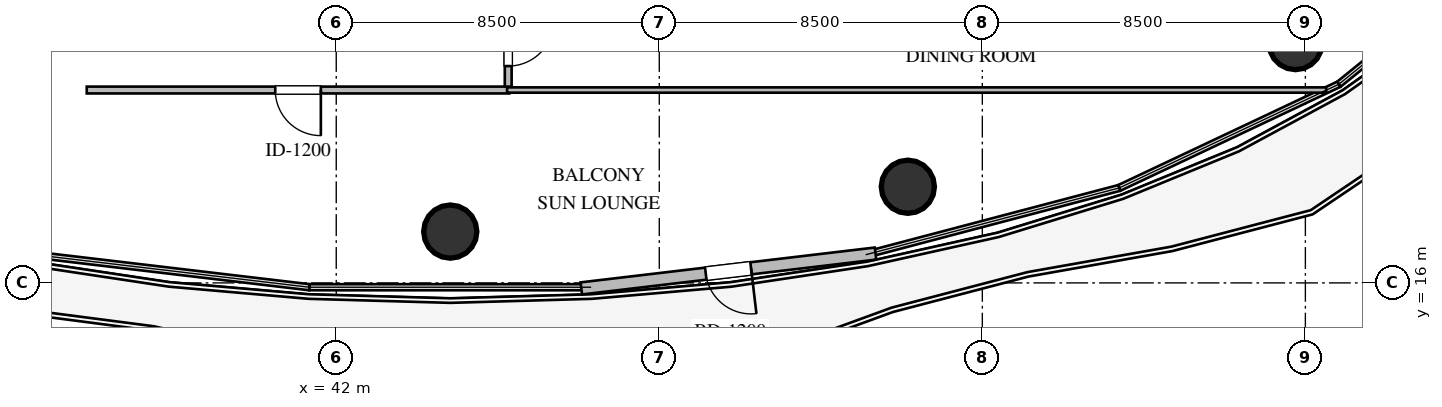
"""IFC4 building model, lengths in metres.
Left out: names, types, materials, properties, quantities, classifications, styles, units other than length and angle.
Written with IfcOpenShell. Run it as: python <this file> out.ifc"""

import sys

from ifc_helpers import new_model, si_unit, direction, frame, frame_2d, origin, origin_2d, place, context, subcontext, project, spatial, rectangle, circle, extrude, element, fill, save


model = new_model("IFC4")
c1 = context("Model", 3, precision=1e-05, world=origin(), true_north=direction((0.0, 1.0)))
c2 = subcontext(c1, "Body", "Model", "MODEL_VIEW")
j1 = project(units=[si_unit("LENGTHUNIT", "METRE"), si_unit("PLANEANGLEUNIT", "RADIAN")], contexts=[c1])
p1 = place(None, origin())
s1 = spatial("IfcSite", under=j1, at=p1, CompositionType="ELEMENT")
p2 = place(p1, origin())
s2 = spatial("IfcBuilding", under=s1, at=p2, CompositionType="ELEMENT")
p3 = place(p2, frame((0.0, 0.0, 85.2)))
s3 = spatial("IfcBuildingStorey", under=s2, at=p3, CompositionType="ELEMENT", Elevation=85.2)
for number, where, z_axis, x_axis in (
    (1, (45.0, 17.35, 0.0), (0.0, 0.0, 1.0), (1.0, 0.0, 0.0)),
    (2, (57.04, 18.53, 0.0), (0.0, 0.0, 1.0), (1.0, 0.0, 0.0)),
    (3, (67.24, 22.31, 0.0), (0.0, 0.0, 1.0), (1.0, 0.0, 0.0)),
):
    element("IfcColumn", number, at=place(p3, frame(where, z_axis=z_axis, x_axis=x_axis)), inside=s3, PredefinedType="COLUMN", context=c2, shape_type="SweptSolid", body=[
        extrude(circle(Radius=0.7, at=origin_2d()), origin(), (0.0, 0.0, 1.0), 3.6),
    ])
p4 = place(p3, frame((56.19, 16.772, 0.0), z_axis=(0.0, 0.0, 1.0), x_axis=(-0.993056646691, -0.117637138959, 0.0)))
e4 = element("IfcWall", 4, at=p4, inside=s3, PredefinedType="STANDARD", context=c2, shape_type="SweptSolid", body=[
    extrude(rectangle(XDim=7.795, YDim=0.32, at=frame_2d((3.897, 0.0))), origin(), (0.0, 0.0, 1.0), 3.36),
])
p5 = place(p4, frame((3.298, 0.0, 0.0)))
e5 = element("IfcOpeningElement", 5, at=p5, cuts=e4, PredefinedType="OPENING", context=c2, shape_type="SweptSolid", body=[
    extrude(rectangle(XDim=1.2, YDim=2.15, at=frame_2d((0.6, 1.075))), frame((0.0, 0.17, 0.0), z_axis=(0.0, -1.0, 0.0), x_axis=(1.0, 0.0, 0.0)), (0.0, 0.0, 1.0), 0.34),
])
p6 = place(p3, frame((46.525, 23.565, 0.0), z_axis=(0.0, 0.0, 1.0), x_axis=(0.0, -1.0, 0.0)))
e6 = element("IfcWall", 6, at=p6, inside=s3, PredefinedType="PARTITIONING", context=c2, shape_type="SweptSolid", body=[
    extrude(rectangle(XDim=2.52, YDim=0.18, at=frame_2d((1.26, 0.0))), origin(), (0.0, 0.0, 1.0), 3.36),
])
p7 = place(p6, frame((0.66, 0.0, 0.0)))
e7 = element("IfcOpeningElement", 7, at=p7, cuts=e6, PredefinedType="OPENING", context=c2, shape_type="SweptSolid", body=[
    extrude(rectangle(XDim=1.2, YDim=2.15, at=frame_2d((0.6, 1.075))), frame((0.0, 0.1, 0.0), z_axis=(0.0, -1.0, 0.0), x_axis=(1.0, 0.0, 0.0)), (0.0, 0.0, 1.0), 0.2),
])
p8 = place(p3, frame((46.555, 21.075, 0.0), z_axis=(0.0, 0.0, 1.0), x_axis=(-1.0, 0.0, 0.0)))
e8 = element("IfcWall", 8, at=p8, inside=s3, PredefinedType="PARTITIONING", context=c2, shape_type="SweptSolid", body=[
    extrude(rectangle(XDim=11.12, YDim=0.18, at=frame_2d((5.56, 0.0))), origin(), (0.0, 0.0, 1.0), 2.996),
])
p9 = place(p8, frame((4.96, 0.0, 0.0)))
e9 = element("IfcOpeningElement", 9, at=p9, cuts=e8, PredefinedType="OPENING", context=c2, shape_type="SweptSolid", body=[
    extrude(rectangle(XDim=1.2, YDim=2.15, at=frame_2d((0.6, 1.075))), frame((0.0, 0.1, 0.0), z_axis=(0.0, -1.0, 0.0), x_axis=(1.0, 0.0, 0.0)), (0.0, 0.0, 1.0), 0.2),
])
p10 = place(p3, frame((68.049, 21.075, 0.0), z_axis=(0.0, 0.0, 1.0), x_axis=(-1.0, 0.0, 0.0)))
e10 = element("IfcWall", 10, at=p10, inside=s3, PredefinedType="PARTITIONING", context=c2, shape_type="SweptSolid", body=[
    extrude(rectangle(XDim=21.554, YDim=0.14, at=frame_2d((10.777, 0.0))), origin(), (0.0, 0.0, 1.0), 2.996),
])
p11 = place(p5, origin())
e11 = element("IfcDoor", 11, at=p11, inside=s3, OperationType="SINGLE_SWING_LEFT", PredefinedType="DOOR", context=c2, shape_type="SweptSolid", body=[
    extrude(rectangle(XDim=1.2, YDim=2.15, at=frame_2d((0.6, 1.075))), frame((0.0, 0.025, 0.0), z_axis=(0.0, -1.0, 0.0), x_axis=(1.0, 0.0, 0.0)), (0.0, 0.0, 1.0), 0.05),
])
fill(e5, e11)
p12 = place(p7, origin())
e12 = element("IfcDoor", 12, at=p12, inside=s3, OperationType="SINGLE_SWING_LEFT", PredefinedType="DOOR", context=c2, shape_type="SweptSolid", body=[
    extrude(rectangle(XDim=1.2, YDim=2.15, at=frame_2d((0.6, 1.075))), frame((0.0, 0.025, 0.0), z_axis=(0.0, -1.0, 0.0), x_axis=(1.0, 0.0, 0.0)), (0.0, 0.0, 1.0), 0.05),
])
fill(e7, e12)
p13 = place(p9, origin())
e13 = element("IfcDoor", 13, at=p13, inside=s3, OperationType="SINGLE_SWING_LEFT", PredefinedType="DOOR", context=c2, shape_type="SweptSolid", body=[
    extrude(rectangle(XDim=1.2, YDim=2.15, at=frame_2d((0.6, 1.075))), frame((0.0, 0.025, 0.0), z_axis=(0.0, -1.0, 0.0), x_axis=(1.0, 0.0, 0.0)), (0.0, 0.0, 1.0), 0.05),
])
fill(e9, e13)
save(model, sys.argv[1])
